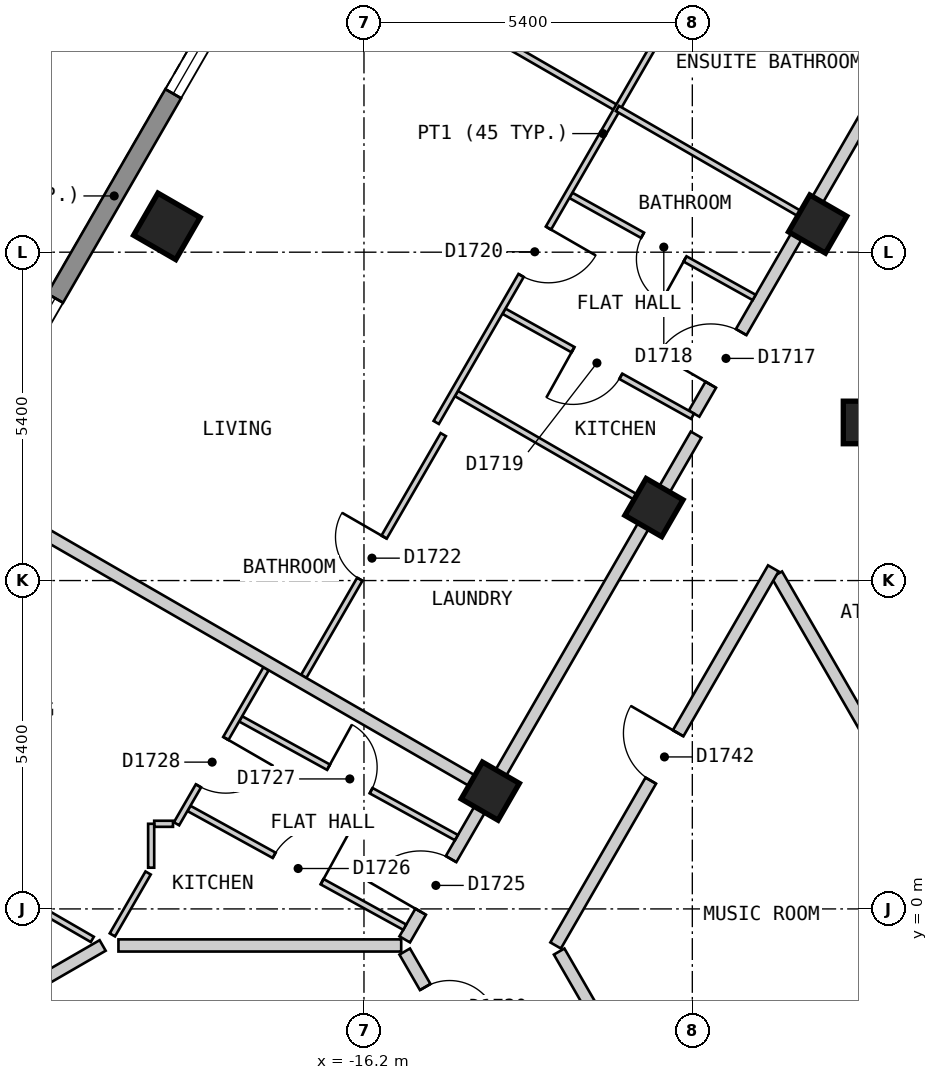
"""IFC4 building model, lengths in metres.
Left out: names, types, materials, properties, quantities, classifications, styles, units other than length and angle.
Written with IfcOpenShell. Run it as: python <this file> out.ifc"""

import sys

from ifc_helpers import new_model, si_unit, direction, frame, frame_2d, origin, origin_2d, place, context, subcontext, project, spatial, polyline, rectangle, outline, extrude, element, fill, save


model = new_model("IFC4")
c1 = context("Model", 3, precision=1e-05, world=origin(), true_north=direction((0.0, 1.0)))
c2 = subcontext(c1, "Body", "Model", "MODEL_VIEW")
j1 = project(units=[si_unit("LENGTHUNIT", "METRE"), si_unit("PLANEANGLEUNIT", "RADIAN")], contexts=[c1])
p1 = place(None, origin())
s1 = spatial("IfcSite", under=j1, at=p1, CompositionType="ELEMENT")
p2 = place(p1, origin())
s2 = spatial("IfcBuilding", under=s1, at=p2, CompositionType="ELEMENT")
p3 = place(p2, frame((0.0, 0.0, 181.2)))
s3 = spatial("IfcBuildingStorey", under=s2, at=p3, CompositionType="ELEMENT", Elevation=181.2)
p4 = place(p3, frame((-19.442, 11.225, 0.0), z_axis=(0.0, 0.0, 1.0), x_axis=(-0.5, -0.866025403784, 0.0)))
e1 = element("IfcColumn", 1, at=p4, inside=s3, PredefinedType="COLUMN", context=c2, shape_type="SweptSolid", body=[
    extrude(rectangle(XDim=0.8, YDim=0.8, at=origin_2d()), origin(), (0.0, 0.0, 1.0), 3.0),
])
for number, where, z_axis, x_axis in (
    (2, (-8.739, 11.263, 0.0), (0.0, 0.0, 1.0), (-0.5, -0.866, 0.0)),
    (3, (-7.967, 8.0, 0.0), (0.0, 0.0, 1.0), (1.0, 0.0, 0.0)),
    (4, (-11.431, 6.6, 0.0), (0.0, 0.0, 1.0), (-0.5, -0.866, 0.0)),
    (5, (-14.123, 1.937, 0.0), (0.0, 0.0, 1.0), (-0.5, -0.866, 0.0)),
):
    element("IfcColumn", number, at=place(p3, frame(where, z_axis=z_axis, x_axis=x_axis)), inside=s3, PredefinedType="COLUMN", context=c2, shape_type="SweptSolid", body=[
        extrude(rectangle(XDim=0.7, YDim=0.7, at=origin_2d()), origin(), (0.0, 0.0, 1.0), 3.0),
    ])
p5 = place(p3, frame((-14.592, 21.625, 0.0), z_axis=(0.0, 0.0, 1.0), x_axis=(-0.500010537973, -0.866019319597, 0.0)))
e6 = element("IfcWall", 6, at=p5, inside=s3, PredefinedType="SOLIDWALL", context=c2, shape_type="SweptSolid", body=[
    extrude(outline(polyline([(0.0, -0.15), (22.863, -0.15), (22.783, 0.15), (0.08, 0.15), (0.0, -0.15)])), origin(), (0.0, 0.0, 1.0), 2.7),
])
p6 = place(p5, frame((2.606, 0.0, 0.15)))
e7 = element("IfcOpeningElement", 7, at=p6, cuts=e6, PredefinedType="OPENING", context=c2, shape_type="SweptSolid", body=[
    extrude(rectangle(XDim=1.5, YDim=2.1, at=frame_2d((0.75, 1.05))), frame((0.0, 0.16, 0.0), z_axis=(0.0, -1.0, 0.0), x_axis=(1.0, 0.0, 0.0)), (0.0, 0.0, 1.0), 0.32),
])
p7 = place(p5, frame((7.99, 0.0, 0.15)))
e8 = element("IfcOpeningElement", 8, at=p7, cuts=e6, PredefinedType="OPENING", context=c2, shape_type="SweptSolid", body=[
    extrude(rectangle(XDim=1.5, YDim=2.1, at=frame_2d((0.75, 1.05))), frame((0.0, 0.16, 0.0), z_axis=(0.0, -1.0, 0.0), x_axis=(1.0, 0.0, 0.0)), (0.0, 0.0, 1.0), 0.32),
])
p8 = place(p5, frame((13.373, 0.0, 0.15)))
e9 = element("IfcOpeningElement", 9, at=p8, cuts=e6, PredefinedType="OPENING", context=c2, shape_type="SweptSolid", body=[
    extrude(rectangle(XDim=1.5, YDim=2.1, at=frame_2d((0.75, 1.05))), frame((0.0, 0.16, 0.0), z_axis=(0.0, -1.0, 0.0), x_axis=(1.0, 0.0, 0.0)), (0.0, 0.0, 1.0), 0.32),
])
p9 = place(p5, frame((18.758, 0.0, 0.15)))
e10 = element("IfcOpeningElement", 10, at=p9, cuts=e6, PredefinedType="OPENING", context=c2, shape_type="SweptSolid", body=[
    extrude(rectangle(XDim=1.5, YDim=2.1, at=frame_2d((0.75, 1.05))), frame((0.0, 0.16, 0.0), z_axis=(0.0, -1.0, 0.0), x_axis=(1.0, 0.0, 0.0)), (0.0, 0.0, 1.0), 0.32),
])
p10 = place(p3, frame((-9.411, 5.5, 0.0), z_axis=(0.0, 0.0, 1.0), x_axis=(0.500018099276, -0.86601495391, 0.0)))
e11 = element("IfcWall", 11, at=p10, inside=s3, PredefinedType="PARTITIONING", context=c2, shape_type="SweptSolid", body=[
    extrude(rectangle(XDim=4.765, YDim=0.2, at=frame_2d((2.383, 0.0))), origin(), (0.0, 0.0, 1.0), 2.7),
])
p11 = place(p3, frame((-12.99, -0.701, 0.0), z_axis=(0.0, 0.0, 1.0), x_axis=(0.499972710878, -0.866041158593, 0.0)))
e12 = element("IfcWall", 12, at=p11, inside=s3, PredefinedType="PARTITIONING", context=c2, shape_type="SweptSolid", body=[
    extrude(rectangle(XDim=2.308, YDim=0.2, at=frame_2d((1.154, 0.0))), origin(), (0.0, 0.0, 1.0), 2.7),
])
p12 = place(p3, frame((-15.53, -0.701, 0.0), z_axis=(0.0, 0.0, 1.0), x_axis=(0.499972710878, -0.866041158593, 0.0)))
e13 = element("IfcWall", 13, at=p12, inside=s3, PredefinedType="PARTITIONING", context=c2, shape_type="SweptSolid", body=[
    extrude(rectangle(XDim=2.308, YDim=0.2, at=frame_2d((1.154, 0.0))), origin(), (0.0, 0.0, 1.0), 2.7),
])
p13 = place(p12, frame((0.674, 0.0, 0.0)))
e14 = element("IfcOpeningElement", 14, at=p13, cuts=e13, PredefinedType="OPENING", context=c2, shape_type="SweptSolid", body=[
    extrude(rectangle(XDim=0.8, YDim=2.1, at=frame_2d((0.4, 1.05))), frame((0.0, 0.11, 0.0), z_axis=(0.0, -1.0, 0.0), x_axis=(1.0, 0.0, 0.0)), (0.0, 0.0, 1.0), 0.22),
])
p14 = place(p3, frame((-13.048, -0.601, 0.0), z_axis=(0.0, 0.0, 1.0), x_axis=(0.499982180423, 0.866035691677, 0.0)))
e15 = element("IfcWall", 15, at=p14, inside=s3, PredefinedType="PARTITIONING", context=c2, shape_type="SweptSolid", body=[
    extrude(rectangle(XDim=7.16, YDim=0.2, at=frame_2d((3.58, 0.0))), origin(), (0.0, 0.0, 1.0), 2.7),
])
p15 = place(p14, frame((3.13, 0.0, 0.0)))
e16 = element("IfcOpeningElement", 16, at=p15, cuts=e15, PredefinedType="OPENING", context=c2, shape_type="SweptSolid", body=[
    extrude(rectangle(XDim=0.9, YDim=2.1, at=frame_2d((0.45, 1.05))), frame((0.0, 0.11, 0.0), z_axis=(0.0, -1.0, 0.0), x_axis=(1.0, 0.0, 0.0)), (0.0, 0.0, 1.0), 0.22),
])
p16 = place(p3, frame((-15.53, -0.501, 0.0), z_axis=(0.0, 0.0, 1.0), x_axis=(0.499952498232, 0.866052827206, 0.0)))
e17 = element("IfcWall", 17, at=p16, inside=s3, PredefinedType="PARTITIONING", context=c2, shape_type="SweptSolid", body=[
    extrude(rectangle(XDim=9.585, YDim=0.2, at=frame_2d((4.792, 0.0))), origin(), (0.0, 0.0, 1.0), 2.7),
])
p17 = place(p16, frame((0.525, 0.0, 0.0)))
e18 = element("IfcOpeningElement", 18, at=p17, cuts=e17, PredefinedType="OPENING", context=c2, shape_type="SweptSolid", body=[
    extrude(rectangle(XDim=1.0, YDim=2.1, at=frame_2d((0.5, 1.05))), frame((0.0, 0.11, 0.0), z_axis=(0.0, -1.0, 0.0), x_axis=(1.0, 0.0, 0.0)), (0.0, 0.0, 1.0), 0.22),
])
p18 = place(p3, frame((-10.771, 8.145, 0.0), z_axis=(0.0, 0.0, 1.0), x_axis=(0.500048075867, 0.865997645391, 0.0)))
e19 = element("IfcWall", 19, at=p18, inside=s3, PredefinedType="PARTITIONING", context=c2, shape_type="SweptSolid", body=[
    extrude(rectangle(XDim=10.687, YDim=0.2, at=frame_2d((5.344, 0.0))), origin(), (0.0, 0.0, 1.0), 2.7),
])
p19 = place(p18, frame((0.549, 0.0, 0.0)))
e20 = element("IfcOpeningElement", 20, at=p19, cuts=e19, PredefinedType="OPENING", context=c2, shape_type="SweptSolid", body=[
    extrude(rectangle(XDim=1.0, YDim=2.1, at=frame_2d((0.5, 1.05))), frame((0.0, 0.11, 0.0), z_axis=(0.0, -1.0, 0.0), x_axis=(1.0, 0.0, 0.0)), (0.0, 0.0, 1.0), 0.22),
])
p20 = place(p3, frame((-18.229, 3.126, 0.0), z_axis=(0.0, 0.0, 1.0), x_axis=(0.876123002581, -0.482087631399, 0.0)))
e21 = element("IfcWall", 21, at=p20, inside=s3, PredefinedType="PARTITIONING", context=c2, shape_type="SweptSolid", body=[
    extrude(rectangle(XDim=4.051, YDim=0.1, at=frame_2d((2.025, 0.0))), origin(), (0.0, 0.0, 1.0), 2.7),
])
p21 = place(p20, frame((1.65, 0.0, 0.0)))
e22 = element("IfcOpeningElement", 22, at=p21, cuts=e21, PredefinedType="OPENING", context=c2, shape_type="SweptSolid", body=[
    extrude(rectangle(XDim=0.8, YDim=2.1, at=frame_2d((0.4, 1.05))), frame((0.0, 0.06, 0.0), z_axis=(0.0, -1.0, 0.0), x_axis=(1.0, 0.0, 0.0)), (0.0, 0.0, 1.0), 0.12),
])
p22 = place(p3, frame((-19.079, 1.653, 0.0), z_axis=(0.0, 0.0, 1.0), x_axis=(0.876097546615, -0.482133890963, 0.0)))
e23 = element("IfcWall", 23, at=p22, inside=s3, PredefinedType="PARTITIONING", context=c2, shape_type="SweptSolid", body=[
    extrude(rectangle(XDim=4.051, YDim=0.1, at=frame_2d((2.025, 0.0))), origin(), (0.0, 0.0, 1.0), 2.7),
])
p23 = place(p22, frame((1.6, 0.0, 0.0)))
e24 = element("IfcOpeningElement", 24, at=p23, cuts=e23, PredefinedType="OPENING", context=c2, shape_type="SweptSolid", body=[
    extrude(rectangle(XDim=0.9, YDim=2.1, at=frame_2d((0.45, 1.05))), frame((0.0, 0.06, 0.0), z_axis=(0.0, -1.0, 0.0), x_axis=(1.0, 0.0, 0.0)), (0.0, 0.0, 1.0), 0.12),
])
p24 = place(p3, frame((-12.798, 11.735, 0.0), z_axis=(0.0, 0.0, 1.0), x_axis=(0.873649600774, -0.486555623816, 0.0)))
e25 = element("IfcWall", 25, at=p24, inside=s3, PredefinedType="PARTITIONING", context=c2, shape_type="SweptSolid", body=[
    extrude(rectangle(XDim=3.451, YDim=0.1, at=frame_2d((1.726, 0.0))), origin(), (0.0, 0.0, 1.0), 2.7),
])
p25 = place(p24, frame((1.35, 0.0, 0.0)))
e26 = element("IfcOpeningElement", 26, at=p25, cuts=e25, PredefinedType="OPENING", context=c2, shape_type="SweptSolid", body=[
    extrude(rectangle(XDim=0.8, YDim=2.1, at=frame_2d((0.4, 1.05))), frame((0.0, 0.06, 0.0), z_axis=(0.0, -1.0, 0.0), x_axis=(1.0, 0.0, 0.0)), (0.0, 0.0, 1.0), 0.12),
])
p26 = place(p3, frame((-13.898, 9.829, 0.0), z_axis=(0.0, 0.0, 1.0), x_axis=(0.873715787747, -0.486436760784, 0.0)))
e27 = element("IfcWall", 27, at=p26, inside=s3, PredefinedType="PARTITIONING", context=c2, shape_type="SweptSolid", body=[
    extrude(rectangle(XDim=3.55, YDim=0.1, at=frame_2d((1.775, 0.0))), origin(), (0.0, 0.0, 1.0), 2.7),
])
p27 = place(p26, frame((1.3, 0.0, 0.0)))
e28 = element("IfcOpeningElement", 28, at=p27, cuts=e27, PredefinedType="OPENING", context=c2, shape_type="SweptSolid", body=[
    extrude(rectangle(XDim=0.9, YDim=2.1, at=frame_2d((0.45, 1.05))), frame((0.0, 0.06, 0.0), z_axis=(0.0, -1.0, 0.0), x_axis=(1.0, 0.0, 0.0)), (0.0, 0.0, 1.0), 0.12),
])
p28 = place(p3, frame((-25.562, 2.325, 0.0), z_axis=(0.0, 0.0, 1.0), x_axis=(0.865998530728, -0.500046542611, 0.0)))
e29 = element("IfcWall", 29, at=p28, inside=s3, PredefinedType="PARTITIONING", context=c2, shape_type="SweptSolid", body=[
    extrude(rectangle(XDim=5.651, YDim=0.1, at=frame_2d((2.826, 0.0))), origin(), (0.0, 0.0, 1.0), 2.7),
])
p29 = place(p28, frame((2.476, 0.0, 0.0)))
e30 = element("IfcOpeningElement", 30, at=p29, cuts=e29, PredefinedType="OPENING", context=c2, shape_type="SweptSolid", body=[
    extrude(rectangle(XDim=0.9, YDim=2.1, at=frame_2d((0.45, 1.05))), frame((0.0, 0.06, 0.0), z_axis=(0.0, -1.0, 0.0), x_axis=(1.0, 0.0, 0.0)), (0.0, 0.0, 1.0), 0.12),
])
p30 = place(p3, frame((-14.679, 8.475, 0.0), z_axis=(0.0, 0.0, 1.0), x_axis=(0.865995104784, -0.500052475737, 0.0)))
e31 = element("IfcWall", 31, at=p30, inside=s3, PredefinedType="PARTITIONING", context=c2, shape_type="SweptSolid", body=[
    extrude(rectangle(XDim=3.65, YDim=0.1, at=frame_2d((1.825, 0.0))), origin(), (0.0, 0.0, 1.0), 2.7),
])
p31 = place(p3, frame((-17.486, 16.313, 0.0), z_axis=(0.0, 0.0, 1.0), x_axis=(0.865997114097, -0.500048995975, 0.0)))
e32 = element("IfcWall", 32, at=p31, inside=s3, PredefinedType="PARTITIONING", context=c2, shape_type="SweptSolid", body=[
    extrude(rectangle(XDim=6.299, YDim=0.1, at=frame_2d((3.149, 0.0))), origin(), (0.0, 0.0, 1.0), 2.7),
])
p32 = place(p31, frame((2.699, 0.0, 0.0)))
e33 = element("IfcOpeningElement", 33, at=p32, cuts=e32, PredefinedType="OPENING", context=c2, shape_type="SweptSolid", body=[
    extrude(rectangle(XDim=0.9, YDim=2.1, at=frame_2d((0.45, 1.05))), frame((0.0, 0.06, 0.0), z_axis=(0.0, -1.0, 0.0), x_axis=(1.0, 0.0, 0.0)), (0.0, 0.0, 1.0), 0.12),
])
p33 = place(p3, frame((-19.65, 1.4, 0.0), z_axis=(0.0, 0.0, 1.0), x_axis=(1.0, 0.0, 0.0)))
e34 = element("IfcWall", 34, at=p33, inside=s3, PredefinedType="PARTITIONING", context=c2, shape_type="SweptSolid", body=[
    extrude(rectangle(XDim=0.309, YDim=0.1, at=frame_2d((0.154, 0.0))), origin(), (0.0, 0.0, 1.0), 2.7),
])
p34 = place(p3, frame((-17.191, 3.824, 0.0), z_axis=(0.0, 0.0, 1.0), x_axis=(0.499891250406, 0.866088181288, 0.0)))
e35 = element("IfcWall", 35, at=p34, inside=s3, PredefinedType="PARTITIONING", context=c2, shape_type="SweptSolid", body=[
    extrude(rectangle(XDim=4.591, YDim=0.1, at=frame_2d((2.295, 0.0))), origin(), (0.0, 0.0, 1.0), 2.7),
])
p35 = place(p34, frame((1.845, 0.0, 0.0)))
e36 = element("IfcOpeningElement", 36, at=p35, cuts=e35, PredefinedType="OPENING", context=c2, shape_type="SweptSolid", body=[
    extrude(rectangle(XDim=0.8, YDim=2.1, at=frame_2d((0.4, 1.05))), frame((0.0, 0.06, 0.0), z_axis=(0.0, -1.0, 0.0), x_axis=(1.0, 0.0, 0.0)), (0.0, 0.0, 1.0), 0.12),
])
p36 = place(p3, frame((-15.012, 8.0, 0.0), z_axis=(0.0, 0.0, 1.0), x_axis=(0.500047346826, 0.865998066356, 0.0)))
e37 = element("IfcWall", 37, at=p36, inside=s3, PredefinedType="PARTITIONING", context=c2, shape_type="SweptSolid", body=[
    extrude(rectangle(XDim=10.971, YDim=0.1, at=frame_2d((5.486, 0.0))), origin(), (0.0, 0.0, 1.0), 2.7),
])
p37 = place(p36, frame((2.791, 0.0, 0.0)))
e38 = element("IfcOpeningElement", 38, at=p37, cuts=e37, PredefinedType="OPENING", context=c2, shape_type="SweptSolid", body=[
    extrude(rectangle(XDim=0.9, YDim=2.1, at=frame_2d((0.45, 1.05))), frame((0.0, 0.06, 0.0), z_axis=(0.0, -1.0, 0.0), x_axis=(1.0, 0.0, 0.0)), (0.0, 0.0, 1.0), 0.12),
])
p38 = place(p36, frame((8.124, 0.0, 0.0)))
e39 = element("IfcOpeningElement", 39, at=p38, cuts=e37, PredefinedType="OPENING", context=c2, shape_type="SweptSolid", body=[
    extrude(rectangle(XDim=0.8, YDim=2.1, at=frame_2d((0.4, 1.05))), frame((0.0, 0.06, 0.0), z_axis=(0.0, -1.0, 0.0), x_axis=(1.0, 0.0, 0.0)), (0.0, 0.0, 1.0), 0.12),
])
p39 = place(p3, frame((-20.338, -0.427, 0.0), z_axis=(0.0, 0.0, 1.0), x_axis=(0.500069990121, 0.865984991198, 0.0)))
e40 = element("IfcWall", 40, at=p39, inside=s3, PredefinedType="PARTITIONING", context=c2, shape_type="SweptSolid", body=[
    extrude(rectangle(XDim=1.176, YDim=0.1, at=frame_2d((0.588, 0.0))), origin(), (0.0, 0.0, 1.0), 2.7),
])
p40 = place(p3, frame((-19.283, 1.4, 0.0), z_axis=(0.0, 0.0, 1.0), x_axis=(0.500160189342, 0.865932898669, 0.0)))
e41 = element("IfcWall", 41, at=p40, inside=s3, PredefinedType="PARTITIONING", context=c2, shape_type="SweptSolid", body=[
    extrude(rectangle(XDim=2.945, YDim=0.1, at=frame_2d((1.472, 0.0))), origin(), (0.0, 0.0, 1.0), 2.7),
])
p41 = place(p40, frame((0.721, 0.0, 0.0)))
e42 = element("IfcOpeningElement", 42, at=p41, cuts=e41, PredefinedType="OPENING", context=c2, shape_type="SweptSolid", body=[
    extrude(rectangle(XDim=0.9, YDim=2.1, at=frame_2d((0.45, 1.05))), frame((0.0, 0.06, 0.0), z_axis=(0.0, -1.0, 0.0), x_axis=(1.0, 0.0, 0.0)), (0.0, 0.0, 1.0), 0.12),
])
p42 = place(p3, frame((-19.7, 0.678, 0.0), z_axis=(0.0, 0.0, 1.0), x_axis=(0.0, 1.0, 0.0)))
e43 = element("IfcWall", 43, at=p42, inside=s3, PredefinedType="PARTITIONING", context=c2, shape_type="SweptSolid", body=[
    extrude(rectangle(XDim=0.722, YDim=0.1, at=frame_2d((0.361, 0.0))), origin(), (0.0, 0.0, 1.0), 2.7),
])
p43 = place(p3, frame((-9.628, 17.877, 0.0), z_axis=(0.0, 0.0, 1.0), x_axis=(0.499890461358, -0.866088636713, 0.0)))
e44 = element("IfcWall", 44, at=p43, inside=s3, PredefinedType="PARTITIONING", context=c2, shape_type="SweptSolid", body=[
    extrude(rectangle(XDim=4.361, YDim=0.2, at=frame_2d((2.18, 0.0))), origin(), (0.0, 0.0, 1.0), 2.7),
])
p44 = place(p3, frame((-22.87, 6.987, 0.0), z_axis=(0.0, 0.0, 1.0), x_axis=(0.866022959057, -0.500004234368, 0.0)))
e45 = element("IfcWall", 45, at=p44, inside=s3, PredefinedType="PARTITIONING", context=c2, shape_type="SweptSolid", body=[
    extrude(rectangle(XDim=10.0, YDim=0.2, at=frame_2d((5.0, 0.0))), origin(), (0.0, 0.0, 1.0), 2.7),
])
p45 = place(p3, frame((-20.238, -0.601, 0.0), z_axis=(0.0, 0.0, 1.0), x_axis=(1.0, 0.0, 0.0)))
e46 = element("IfcWall", 46, at=p45, inside=s3, PredefinedType="PARTITIONING", context=c2, shape_type="SweptSolid", body=[
    extrude(rectangle(XDim=4.65, YDim=0.2, at=frame_2d((2.325, 0.0))), origin(), (0.0, 0.0, 1.0), 2.7),
])
p46 = place(p3, frame((-25.563, -3.524, 0.0), z_axis=(0.0, 0.0, 1.0), x_axis=(0.866128586522, 0.499821239653, 0.0)))
e47 = element("IfcWall", 47, at=p46, inside=s3, PredefinedType="PARTITIONING", context=c2, shape_type="SweptSolid", body=[
    extrude(rectangle(XDim=5.848, YDim=0.2, at=frame_2d((2.924, 0.0))), origin(), (0.0, 0.0, 1.0), 2.7),
])
p47 = place(p3, frame((-12.031, 13.163, 0.0), z_axis=(0.0, 0.0, 1.0), x_axis=(0.86608920467, -0.499889477339, 0.0)))
e48 = element("IfcWall", 48, at=p47, inside=s3, PredefinedType="PARTITIONING", context=c2, shape_type="SweptSolid", body=[
    extrude(rectangle(XDim=3.501, YDim=0.1, at=frame_2d((1.75, 0.0))), origin(), (0.0, 0.0, 1.0), 2.7),
])
p48 = place(p7, origin())
e49 = element("IfcWindow", 49, at=p48, inside=s3, PartitioningType="SINGLE_PANEL", PredefinedType="WINDOW", context=c2, shape_type="SweptSolid", body=[
    extrude(rectangle(XDim=1.5, YDim=2.1, at=frame_2d((0.75, 1.05))), frame((0.0, 0.03, 0.0), z_axis=(0.0, -1.0, 0.0), x_axis=(1.0, 0.0, 0.0)), (0.0, 0.0, 1.0), 0.06),
])
fill(e8, e49)
p49 = place(p8, origin())
e50 = element("IfcWindow", 50, at=p49, inside=s3, PartitioningType="SINGLE_PANEL", PredefinedType="WINDOW", context=c2, shape_type="SweptSolid", body=[
    extrude(rectangle(XDim=1.5, YDim=2.1, at=frame_2d((0.75, 1.05))), frame((0.0, 0.03, 0.0), z_axis=(0.0, -1.0, 0.0), x_axis=(1.0, 0.0, 0.0)), (0.0, 0.0, 1.0), 0.06),
])
fill(e9, e50)
p50 = place(p19, origin())
e51 = element("IfcDoor", 51, at=p50, inside=s3, OperationType="SINGLE_SWING_LEFT", PredefinedType="DOOR", context=c2, shape_type="SweptSolid", body=[
    extrude(rectangle(XDim=1.0, YDim=2.1, at=frame_2d((0.5, 1.05))), frame((0.0, 0.025, 0.0), z_axis=(0.0, -1.0, 0.0), x_axis=(1.0, 0.0, 0.0)), (0.0, 0.0, 1.0), 0.05),
])
fill(e20, e51)
p51 = place(p25, origin())
e52 = element("IfcDoor", 52, at=p51, inside=s3, OperationType="SINGLE_SWING_RIGHT", PredefinedType="DOOR", context=c2, shape_type="SweptSolid", body=[
    extrude(rectangle(XDim=0.8, YDim=2.1, at=frame_2d((0.4, 1.05))), frame((0.0, 0.025, 0.0), z_axis=(0.0, -1.0, 0.0), x_axis=(1.0, 0.0, 0.0)), (0.0, 0.0, 1.0), 0.05),
])
fill(e26, e52)
p52 = place(p27, origin())
e53 = element("IfcDoor", 53, at=p52, inside=s3, OperationType="SINGLE_SWING_LEFT", PredefinedType="DOOR", context=c2, shape_type="SweptSolid", body=[
    extrude(rectangle(XDim=0.9, YDim=2.1, at=frame_2d((0.45, 1.05))), frame((0.0, 0.025, 0.0), z_axis=(0.0, -1.0, 0.0), x_axis=(1.0, 0.0, 0.0)), (0.0, 0.0, 1.0), 0.05),
])
fill(e28, e53)
p53 = place(p37, origin())
e54 = element("IfcDoor", 54, at=p53, inside=s3, OperationType="SINGLE_SWING_RIGHT", PredefinedType="DOOR", context=c2, shape_type="SweptSolid", body=[
    extrude(rectangle(XDim=0.9, YDim=2.1, at=frame_2d((0.45, 1.05))), frame((0.0, 0.025, 0.0), z_axis=(0.0, -1.0, 0.0), x_axis=(1.0, 0.0, 0.0)), (0.0, 0.0, 1.0), 0.05),
])
fill(e38, e54)
p54 = place(p35, origin())
e55 = element("IfcDoor", 55, at=p54, inside=s3, OperationType="SINGLE_SWING_RIGHT", PredefinedType="DOOR", context=c2, shape_type="SweptSolid", body=[
    extrude(rectangle(XDim=0.8, YDim=2.1, at=frame_2d((0.4, 1.05))), frame((0.0, 0.025, 0.0), z_axis=(0.0, -1.0, 0.0), x_axis=(1.0, 0.0, 0.0)), (0.0, 0.0, 1.0), 0.05),
])
fill(e36, e55)
p55 = place(p17, origin())
e56 = element("IfcDoor", 56, at=p55, inside=s3, OperationType="SINGLE_SWING_LEFT", PredefinedType="DOOR", context=c2, shape_type="SweptSolid", body=[
    extrude(rectangle(XDim=1.0, YDim=2.1, at=frame_2d((0.5, 1.05))), frame((0.0, 0.025, 0.0), z_axis=(0.0, -1.0, 0.0), x_axis=(1.0, 0.0, 0.0)), (0.0, 0.0, 1.0), 0.05),
])
fill(e18, e56)
p56 = place(p23, origin())
e57 = element("IfcDoor", 57, at=p56, inside=s3, OperationType="SINGLE_SWING_RIGHT", PredefinedType="DOOR", context=c2, shape_type="SweptSolid", body=[
    extrude(rectangle(XDim=0.9, YDim=2.1, at=frame_2d((0.45, 1.05))), frame((0.0, 0.025, 0.0), z_axis=(0.0, -1.0, 0.0), x_axis=(1.0, 0.0, 0.0)), (0.0, 0.0, 1.0), 0.05),
])
fill(e24, e57)
p57 = place(p21, origin())
e58 = element("IfcDoor", 58, at=p57, inside=s3, OperationType="SINGLE_SWING_LEFT", PredefinedType="DOOR", context=c2, shape_type="SweptSolid", body=[
    extrude(rectangle(XDim=0.8, YDim=2.1, at=frame_2d((0.4, 1.05))), frame((0.0, 0.025, 0.0), z_axis=(0.0, -1.0, 0.0), x_axis=(1.0, 0.0, 0.0)), (0.0, 0.0, 1.0), 0.05),
])
fill(e22, e58)
p58 = place(p41, origin())
e59 = element("IfcDoor", 59, at=p58, inside=s3, OperationType="SINGLE_SWING_RIGHT", PredefinedType="DOOR", context=c2, shape_type="SweptSolid", body=[
    extrude(rectangle(XDim=0.9, YDim=2.1, at=frame_2d((0.45, 1.05))), frame((0.0, 0.025, 0.0), z_axis=(0.0, -1.0, 0.0), x_axis=(1.0, 0.0, 0.0)), (0.0, 0.0, 1.0), 0.05),
])
fill(e42, e59)
p59 = place(p13, origin())
e60 = element("IfcDoor", 60, at=p59, inside=s3, OperationType="SINGLE_SWING_RIGHT", PredefinedType="DOOR", context=c2, shape_type="SweptSolid", body=[
    extrude(rectangle(XDim=0.8, YDim=2.1, at=frame_2d((0.4, 1.05))), frame((0.0, 0.025, 0.0), z_axis=(0.0, -1.0, 0.0), x_axis=(1.0, 0.0, 0.0)), (0.0, 0.0, 1.0), 0.05),
])
fill(e14, e60)
p60 = place(p15, origin())
e61 = element("IfcDoor", 61, at=p60, inside=s3, OperationType="SINGLE_SWING_RIGHT", PredefinedType="DOOR", context=c2, shape_type="SweptSolid", body=[
    extrude(rectangle(XDim=0.9, YDim=2.1, at=frame_2d((0.45, 1.05))), frame((0.0, 0.025, 0.0), z_axis=(0.0, -1.0, 0.0), x_axis=(1.0, 0.0, 0.0)), (0.0, 0.0, 1.0), 0.05),
])
fill(e16, e61)
save(model, sys.argv[1])
